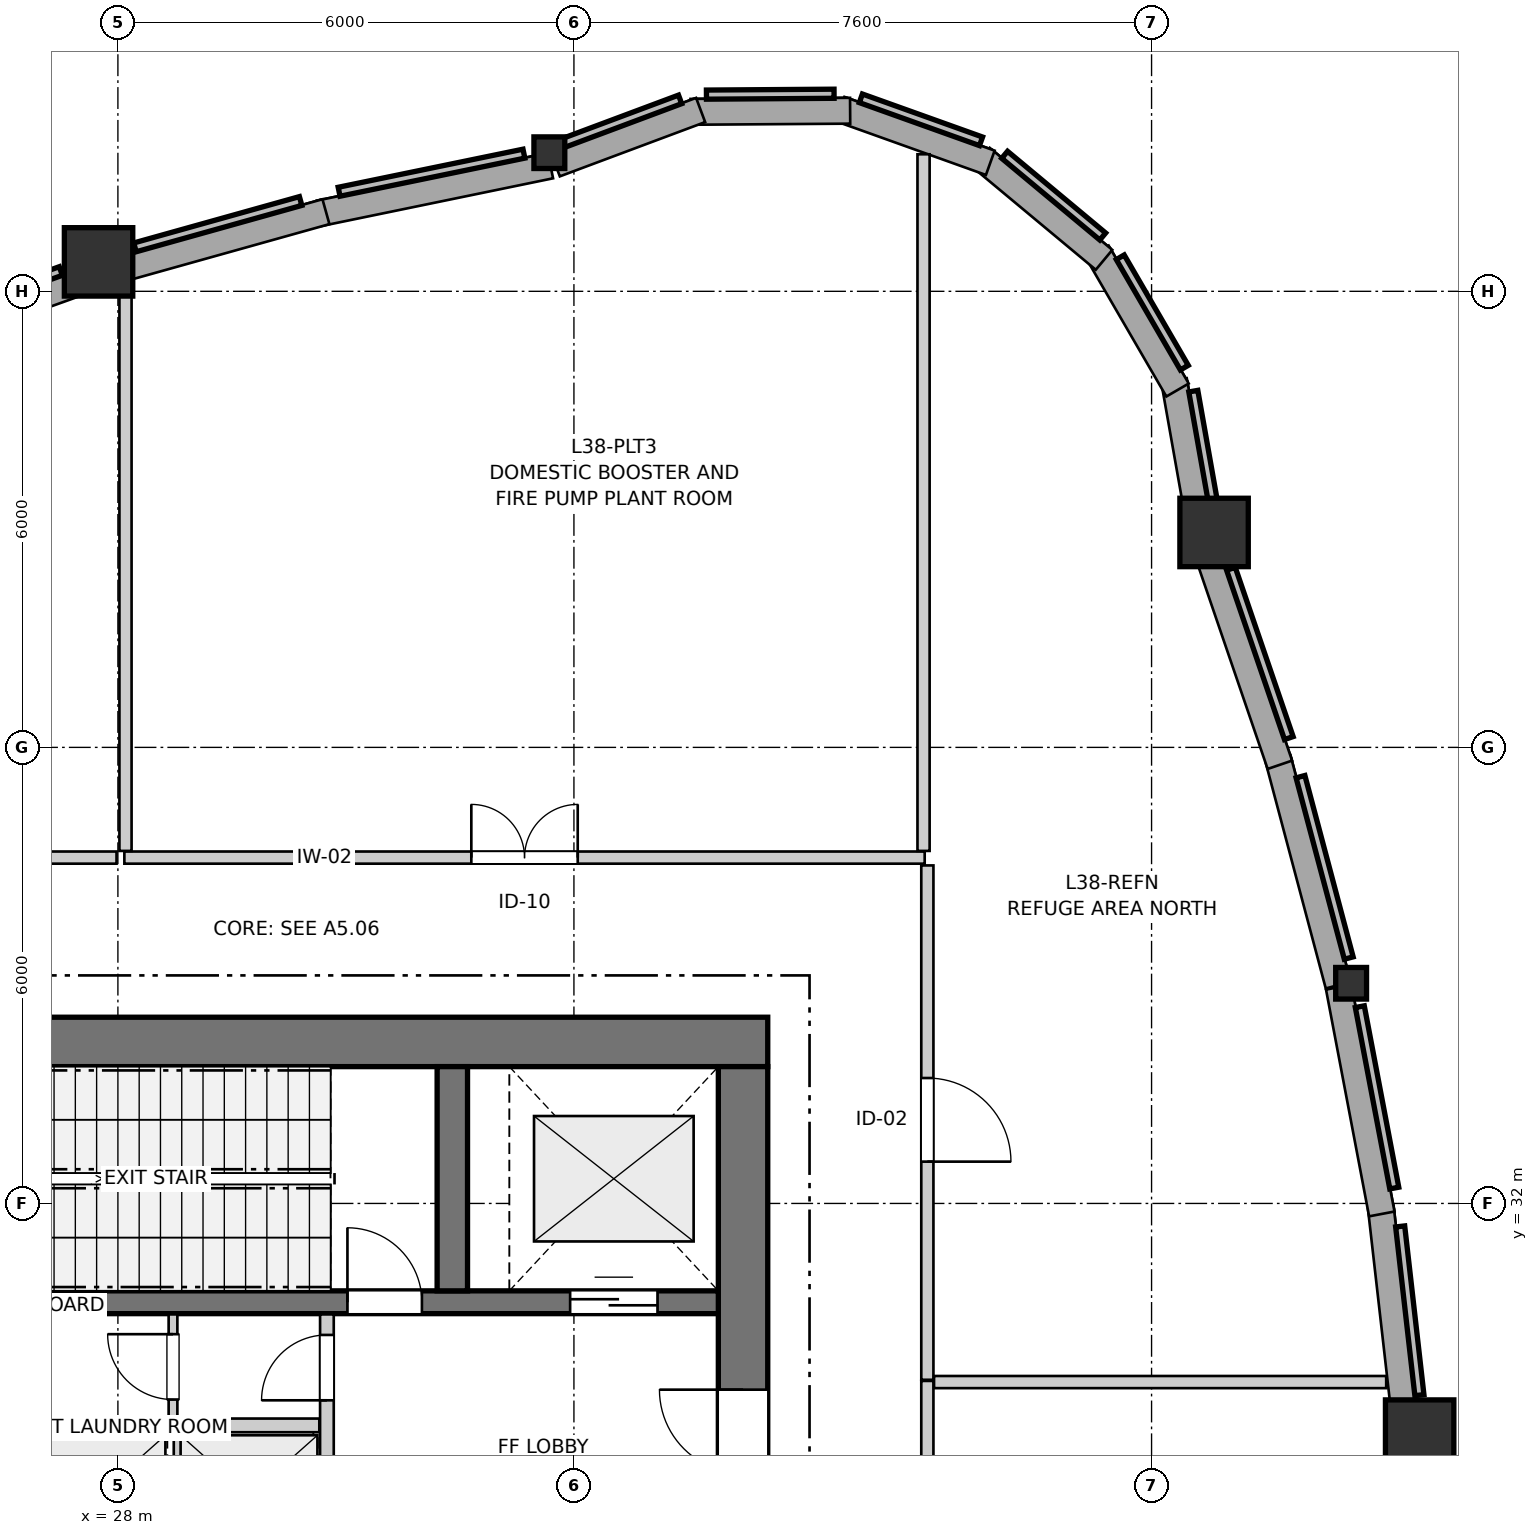
"""IFC4 building model, lengths in metres.
Left out: names, types, materials, properties, quantities, classifications, styles, units other than length and angle.
Written with IfcOpenShell. Run it as: python <this file> out.ifc"""

import sys

from ifc_helpers import new_model, si_unit, direction, frame, frame_2d, origin, origin_2d, place, context, subcontext, project, spatial, rectangle, i_section, extrude, source, transform, mapped, element, fill, save


model = new_model("IFC4")
c1 = context("Model", 3, precision=1e-05, world=origin(), true_north=direction((0.0, 1.0)))
c2 = subcontext(c1, "Body", "Model", "MODEL_VIEW")
j1 = project(units=[si_unit("LENGTHUNIT", "METRE"), si_unit("PLANEANGLEUNIT", "RADIAN")], contexts=[c1])
p1 = place(None, origin())
s1 = spatial("IfcSite", under=j1, at=p1, CompositionType="ELEMENT")
p2 = place(p1, origin())
s2 = spatial("IfcBuilding", under=s1, at=p2, CompositionType="ELEMENT")
p3 = place(p2, frame((0.0, 0.0, 128.0)))
s3 = spatial("IfcBuildingStorey", under=s2, at=p3, CompositionType="ELEMENT", Elevation=128.0)
p4 = place(p3, frame((36.55, 34.125, 0.0), z_axis=(0.0, 0.0, 1.0), x_axis=(-1.0, 0.0, 0.0)))
e1 = element("IfcWall", 1, at=p4, inside=s3, PredefinedType="SHEAR", context=c2, shape_type="SweptSolid", body=[
    extrude(rectangle(XDim=12.4, YDim=0.65, at=frame_2d((6.2, 0.0))), origin(), (0.0, 0.0, 1.0), 4.75),
])
p5 = place(p3, frame((36.225, 18.2, 0.0), z_axis=(0.0, 0.0, 1.0), x_axis=(0.0, 1.0, 0.0)))
e2 = element("IfcWall", 2, at=p5, inside=s3, PredefinedType="SHEAR", context=c2, shape_type="SweptSolid", body=[
    extrude(rectangle(XDim=15.6, YDim=0.65, at=frame_2d((7.8, 0.0))), origin(), (0.0, 0.0, 1.0), 4.75),
])
p6 = place(p5, frame((4.25, 0.0, 0.0)))
e3 = element("IfcOpeningElement", 3, at=p6, cuts=e2, PredefinedType="OPENING", context=c2, shape_type="SweptSolid", body=[
    extrude(rectangle(XDim=1.1, YDim=2.15, at=frame_2d((0.55, 1.075))), frame((0.0, 0.335, 0.0), z_axis=(0.0, -1.0, 0.0), x_axis=(1.0, 0.0, 0.0)), (0.0, 0.0, 1.0), 0.67),
])
p7 = place(p5, frame((10.25, 0.0, 0.0)))
e4 = element("IfcOpeningElement", 4, at=p7, cuts=e2, PredefinedType="OPENING", context=c2, shape_type="SweptSolid", body=[
    extrude(rectangle(XDim=1.1, YDim=2.15, at=frame_2d((0.55, 1.075))), frame((0.0, 0.335, 0.0), z_axis=(0.0, -1.0, 0.0), x_axis=(1.0, 0.0, 0.0)), (0.0, 0.0, 1.0), 0.67),
])
p8 = place(p3, frame((24.8, 30.7, 0.0), z_axis=(0.0, 0.0, 1.0), x_axis=(1.0, 0.0, 0.0)))
e5 = element("IfcWall", 5, at=p8, inside=s3, PredefinedType="SHEAR", context=c2, shape_type="SweptSolid", body=[
    extrude(rectangle(XDim=11.1, YDim=0.3, at=frame_2d((5.55, 0.0))), origin(), (0.0, 0.0, 1.0), 4.75),
])
p9 = place(p8, frame((6.22, 0.0, 0.0)))
e6 = element("IfcOpeningElement", 6, at=p9, cuts=e5, PredefinedType="OPENING", context=c2, shape_type="SweptSolid", body=[
    extrude(rectangle(XDim=0.98, YDim=2.15, at=frame_2d((0.49, 1.075))), frame((0.0, 0.16, 0.0), z_axis=(0.0, -1.0, 0.0), x_axis=(1.0, 0.0, 0.0)), (0.0, 0.0, 1.0), 0.32),
])
p10 = place(p8, frame((9.15, 0.0, 0.0)))
e7 = element("IfcOpeningElement", 7, at=p10, cuts=e5, PredefinedType="OPENING", context=c2, shape_type="SweptSolid", body=[
    extrude(rectangle(XDim=1.15, YDim=2.15, at=frame_2d((0.575, 1.075))), frame((0.0, 0.16, 0.0), z_axis=(0.0, -1.0, 0.0), x_axis=(1.0, 0.0, 0.0)), (0.0, 0.0, 1.0), 0.32),
])
p11 = place(p3, frame((32.4, 30.85, 0.0), z_axis=(0.0, 0.0, 1.0), x_axis=(0.0, 1.0, 0.0)))
e8 = element("IfcWall", 8, at=p11, inside=s3, PredefinedType="SHEAR", context=c2, shape_type="SweptSolid", body=[
    extrude(rectangle(XDim=2.95, YDim=0.4, at=frame_2d((1.475, 0.0))), origin(), (0.0, 0.0, 1.0), 4.75),
])
m1 = source(origin(), c2, "Body", "SweptSolid", [
    extrude(rectangle(XDim=0.9, YDim=0.9, at=origin_2d()), origin(), (0.0, 0.0, 1.0), 4.75),
])
p12 = place(p3, frame((45.127, 28.966, 0.0), z_axis=(0.0, 0.0, 1.0), x_axis=(1.0, 0.0, 0.0)))
e9 = element("IfcColumn", 9, at=p12, inside=s3, PredefinedType="COLUMN", context=c2, shape_type="MappedRepresentation", body=[
    mapped(m1, transform((0.0, 0.0, 0.0), x_axis=(1.0, 0.0, 0.0), y_axis=(0.0, 1.0, 0.0), z_axis=(0.0, 0.0, 1.0), scale=1.0)),
])
m2 = source(origin(), c2, "Body", "SweptSolid", [
    extrude(i_section(OverallWidth=0.406, OverallDepth=0.416, WebThickness=0.027, FlangeThickness=0.044, FilletRadius=0.015, at=origin_2d()), origin(), (0.0, 0.0, 1.0), 4.75),
])
p13 = place(p3, frame((44.226, 34.896, 0.0), z_axis=(0.0, 0.0, 1.0), x_axis=(1.0, 0.0, 0.0)))
e10 = element("IfcColumn", 10, at=p13, inside=s3, PredefinedType="PILASTER", context=c2, shape_type="MappedRepresentation", body=[
    mapped(m2, transform((0.0, 0.0, 0.0), x_axis=(1.0, 0.0, 0.0), y_axis=(0.0, 1.0, 0.0), z_axis=(0.0, 0.0, 1.0), scale=1.0)),
])
p14 = place(p3, frame((42.423, 40.828, 0.0), z_axis=(0.0, 0.0, 1.0), x_axis=(1.0, 0.0, 0.0)))
e11 = element("IfcColumn", 11, at=p14, inside=s3, PredefinedType="COLUMN", context=c2, shape_type="MappedRepresentation", body=[
    mapped(m1, transform((0.0, 0.0, 0.0), x_axis=(1.0, 0.0, 0.0), y_axis=(0.0, 1.0, 0.0), z_axis=(0.0, 0.0, 1.0), scale=1.0)),
])
p15 = place(p3, frame((33.677, 45.824, 0.0), z_axis=(0.0, 0.0, 1.0), x_axis=(1.0, 0.0, 0.0)))
e12 = element("IfcColumn", 12, at=p15, inside=s3, PredefinedType="PILASTER", context=c2, shape_type="MappedRepresentation", body=[
    mapped(m2, transform((0.0, 0.0, 0.0), x_axis=(1.0, 0.0, 0.0), y_axis=(0.0, 1.0, 0.0), z_axis=(0.0, 0.0, 1.0), scale=1.0)),
])
p16 = place(p3, frame((27.746, 44.387, 0.0), z_axis=(0.0, 0.0, 1.0), x_axis=(1.0, 0.0, 0.0)))
e13 = element("IfcColumn", 13, at=p16, inside=s3, PredefinedType="COLUMN", context=c2, shape_type="MappedRepresentation", body=[
    mapped(m1, transform((0.0, 0.0, 0.0), x_axis=(1.0, 0.0, 0.0), y_axis=(0.0, 1.0, 0.0), z_axis=(0.0, 0.0, 1.0), scale=1.0)),
])
p17 = place(p3, frame((45.071, 25.956, 0.0), z_axis=(0.0, 0.0, 1.0), x_axis=(-0.037997361734, 0.999277839493, 0.0)))
e14 = element("IfcWall", 14, at=p17, inside=s3, PredefinedType="SOLIDWALL", context=c2, shape_type="SweptSolid", body=[
    extrude(rectangle(XDim=2.776, YDim=0.34, at=frame_2d((1.388, 0.0))), origin(), (0.0, 0.0, 1.0), 4.28),
])
p18 = place(p3, frame((44.932, 29.175, 0.0), z_axis=(0.0, 0.0, 1.0), x_axis=(-0.113290188042, 0.993561942354, 0.0)))
e15 = element("IfcWall", 15, at=p18, inside=s3, PredefinedType="SOLIDWALL", context=c2, shape_type="SweptSolid", body=[
    extrude(rectangle(XDim=2.793, YDim=0.34, at=frame_2d((1.396, 0.0))), origin(), (0.0, 0.0, 1.0), 4.28),
])
p19 = place(p3, frame((44.629, 31.862, 0.0), z_axis=(0.0, 0.0, 1.0), x_axis=(-0.186690909565, 0.982418701108, 0.0)))
e16 = element("IfcWall", 16, at=p19, inside=s3, PredefinedType="SOLIDWALL", context=c2, shape_type="SweptSolid", body=[
    extrude(rectangle(XDim=3.037, YDim=0.34, at=frame_2d((1.518, 0.0))), origin(), (0.0, 0.0, 1.0), 4.28),
])
p20 = place(p3, frame((44.056, 34.872, 0.0), z_axis=(0.0, 0.0, 1.0), x_axis=(-0.257081647056, 0.966389686797, 0.0)))
e17 = element("IfcWall", 17, at=p20, inside=s3, PredefinedType="SOLIDWALL", context=c2, shape_type="SweptSolid", body=[
    extrude(rectangle(XDim=3.086, YDim=0.34, at=frame_2d((1.543, 0.0))), origin(), (0.0, 0.0, 1.0), 4.28),
])
p21 = place(p3, frame((43.288, 37.771, 0.0), z_axis=(0.0, 0.0, 1.0), x_axis=(-0.323537149191, 0.94621546864, 0.0)))
e18 = element("IfcWall", 18, at=p21, inside=s3, PredefinedType="SOLIDWALL", context=c2, shape_type="SweptSolid", body=[
    extrude(rectangle(XDim=2.942, YDim=0.34, at=frame_2d((1.471, 0.0))), origin(), (0.0, 0.0, 1.0), 4.28),
])
p22 = place(p3, frame((42.215, 41.024, 0.0), z_axis=(0.0, 0.0, 1.0), x_axis=(-0.17440141227, 0.984674640375, 0.0)))
e19 = element("IfcWall", 19, at=p22, inside=s3, PredefinedType="SOLIDWALL", context=c2, shape_type="SweptSolid", body=[
    extrude(rectangle(XDim=1.831, YDim=0.34, at=frame_2d((0.916, 0.0))), origin(), (0.0, 0.0, 1.0), 4.28),
])
p23 = place(p3, frame((41.942, 42.701, 0.0), z_axis=(0.0, 0.0, 1.0), x_axis=(-0.501902596059, 0.864924149315, 0.0)))
e20 = element("IfcWall", 20, at=p23, inside=s3, PredefinedType="SOLIDWALL", context=c2, shape_type="SweptSolid", body=[
    extrude(rectangle(XDim=2.099, YDim=0.34, at=frame_2d((1.049, 0.0))), origin(), (0.0, 0.0, 1.0), 4.28),
])
for number, where, z_axis, x_axis in (
    (21, (40.975, 44.414, 0.0), (0.0, 0.0, 1.0), (-0.768, 0.64, 0.0)),
    (22, (39.478, 45.691, 0.0), (0.0, 0.0, 1.0), (-0.942, 0.337, 0.0)),
    (23, (37.634, 46.376, 0.0), (0.0, 0.0, 1.0), (-1.0, -0.007, 0.0)),
):
    element("IfcWall", number, at=place(p3, frame(where, z_axis=z_axis, x_axis=x_axis)), inside=s3, PredefinedType="SOLIDWALL", context=c2, shape_type="SweptSolid", body=[
        extrude(rectangle(XDim=2.099, YDim=0.34, at=frame_2d((1.05, 0.0))), origin(), (0.0, 0.0, 1.0), 4.28),
    ])
p24 = place(p3, frame((35.667, 46.386, 0.0), z_axis=(0.0, 0.0, 1.0), x_axis=(-0.936761017964, -0.34996970615, 0.0)))
e24 = element("IfcWall", 24, at=p24, inside=s3, PredefinedType="SOLIDWALL", context=c2, shape_type="SweptSolid", body=[
    extrude(rectangle(XDim=2.041, YDim=0.34, at=frame_2d((1.021, 0.0))), origin(), (0.0, 0.0, 1.0), 4.28),
])
p25 = place(p3, frame((33.691, 45.653, 0.0), z_axis=(0.0, 0.0, 1.0), x_axis=(-0.979414063846, -0.201861565287, 0.0)))
e25 = element("IfcWall", 25, at=p25, inside=s3, PredefinedType="SOLIDWALL", context=c2, shape_type="SweptSolid", body=[
    extrude(rectangle(XDim=3.104, YDim=0.34, at=frame_2d((1.552, 0.0))), origin(), (0.0, 0.0, 1.0), 4.28),
])
p26 = place(p3, frame((30.737, 45.048, 0.0), z_axis=(0.0, 0.0, 1.0), x_axis=(-0.963026728711, -0.26940586443, 0.0)))
e26 = element("IfcWall", 26, at=p26, inside=s3, PredefinedType="SOLIDWALL", context=c2, shape_type="SweptSolid", body=[
    extrude(rectangle(XDim=2.829, YDim=0.34, at=frame_2d((1.415, 0.0))), origin(), (0.0, 0.0, 1.0), 4.28),
])
p27 = place(p3, frame((27.586, 44.149, 0.0), z_axis=(0.0, 0.0, 1.0), x_axis=(-0.941112277287, -0.338094190338, 0.0)))
e27 = element("IfcWall", 27, at=p27, inside=s3, PredefinedType="SOLIDWALL", context=c2, shape_type="SweptSolid", body=[
    extrude(rectangle(XDim=2.779, YDim=0.34, at=frame_2d((1.39, 0.0))), origin(), (0.0, 0.0, 1.0), 4.28),
])
p28 = place(p3, frame((30.75, 27.43, 0.0), z_axis=(0.0, 0.0, 1.0), x_axis=(0.0, 1.0, 0.0)))
e28 = element("IfcWall", 28, at=p28, inside=s3, PredefinedType="PARTITIONING", context=c2, shape_type="SweptSolid", body=[
    extrude(rectangle(XDim=3.11, YDim=0.18, at=frame_2d((1.555, 0.0))), origin(), (0.0, 0.0, 1.0), 4.75),
])
p29 = place(p28, frame((1.98, 0.0, 0.0)))
e29 = element("IfcOpeningElement", 29, at=p29, cuts=e28, PredefinedType="OPENING", context=c2, shape_type="SweptSolid", body=[
    extrude(rectangle(XDim=0.86, YDim=2.05, at=frame_2d((0.43, 1.025))), frame((0.0, 0.1, 0.0), z_axis=(0.0, -1.0, 0.0), x_axis=(1.0, 0.0, 0.0)), (0.0, 0.0, 1.0), 0.2),
])
p30 = place(p3, frame((24.81, 29.08, 0.0), z_axis=(0.0, 0.0, 1.0), x_axis=(1.0, 0.0, 0.0)))
e30 = element("IfcWall", 30, at=p30, inside=s3, PredefinedType="PARTITIONING", context=c2, shape_type="SweptSolid", body=[
    extrude(rectangle(XDim=5.84, YDim=0.18, at=frame_2d((2.92, 0.0))), origin(), (0.0, 0.0, 1.0), 4.75),
])
p31 = place(p3, frame((28.825, 27.2, 0.0), z_axis=(0.0, 0.0, 1.0), x_axis=(0.0, 1.0, 0.0)))
e31 = element("IfcWall", 31, at=p31, inside=s3, PredefinedType="PARTITIONING", context=c2, shape_type="SweptSolid", body=[
    extrude(rectangle(XDim=1.78, YDim=0.18, at=frame_2d((0.89, 0.0))), origin(), (0.0, 0.0, 1.0), 4.75),
])
p32 = place(p3, frame((28.725, 29.16, 0.0), z_axis=(0.0, 0.0, 1.0), x_axis=(0.0, 1.0, 0.0)))
e32 = element("IfcWall", 32, at=p32, inside=s3, PredefinedType="PARTITIONING", context=c2, shape_type="SweptSolid", body=[
    extrude(rectangle(XDim=1.38, YDim=0.115, at=frame_2d((0.69, 0.0))), origin(), (0.0, 0.0, 1.0), 4.75),
])
p33 = place(p32, frame((0.26, 0.0, 0.0)))
e33 = element("IfcOpeningElement", 33, at=p33, cuts=e32, PredefinedType="OPENING", context=c2, shape_type="SweptSolid", body=[
    extrude(rectangle(XDim=0.86, YDim=2.05, at=frame_2d((0.43, 1.025))), frame((0.0, 0.067, 0.0), z_axis=(0.0, -1.0, 0.0), x_axis=(1.0, 0.0, 0.0)), (0.0, 0.0, 1.0), 0.135),
])
p34 = place(p3, frame((28.085, 36.55, 0.0), z_axis=(0.0, 0.0, 1.0), x_axis=(1.0, 0.0, 0.0)))
e34 = element("IfcWall", 34, at=p34, inside=s3, PredefinedType="PARTITIONING", context=c2, shape_type="SweptSolid", body=[
    extrude(rectangle(XDim=10.53, YDim=0.16, at=frame_2d((5.265, 0.0))), origin(), (0.0, 0.0, 1.0), 4.218),
])
p35 = place(p34, frame((4.565, 0.0, 0.0)))
e35 = element("IfcOpeningElement", 35, at=p35, cuts=e34, PredefinedType="OPENING", context=c2, shape_type="SweptSolid", body=[
    extrude(rectangle(XDim=1.4, YDim=2.15, at=frame_2d((0.7, 1.075))), frame((0.0, 0.09, 0.0), z_axis=(0.0, -1.0, 0.0), x_axis=(1.0, 0.0, 0.0)), (0.0, 0.0, 1.0), 0.18),
])
p36 = place(p3, frame((38.65, 29.665, 0.0), z_axis=(0.0, 0.0, 1.0), x_axis=(0.0, -1.0, 0.0)))
e36 = element("IfcWall", 36, at=p36, inside=s3, PredefinedType="PARTITIONING", context=c2, shape_type="SweptSolid", body=[
    extrude(rectangle(XDim=7.33, YDim=0.16, at=frame_2d((3.665, 0.0))), origin(), (0.0, 0.0, 1.0), 4.75),
])
p37 = place(p36, frame((2.965, 0.0, 0.0)))
e37 = element("IfcOpeningElement", 37, at=p37, cuts=e36, PredefinedType="OPENING", context=c2, shape_type="SweptSolid", body=[
    extrude(rectangle(XDim=1.4, YDim=2.15, at=frame_2d((0.7, 1.075))), frame((0.0, 0.09, 0.0), z_axis=(0.0, -1.0, 0.0), x_axis=(1.0, 0.0, 0.0)), (0.0, 0.0, 1.0), 0.18),
])
p38 = place(p3, frame((38.65, 36.447, 0.0), z_axis=(0.0, 0.0, 1.0), x_axis=(0.0, -1.0, 0.0)))
e38 = element("IfcWall", 38, at=p38, inside=s3, PredefinedType="PARTITIONING", context=c2, shape_type="SweptSolid", body=[
    extrude(rectangle(XDim=6.767, YDim=0.16, at=frame_2d((3.384, 0.0))), origin(), (0.0, 0.0, 1.0), 4.218),
])
p39 = place(p38, frame((2.797, 0.0, 0.0)))
e39 = element("IfcOpeningElement", 39, at=p39, cuts=e38, PredefinedType="OPENING", context=c2, shape_type="SweptSolid", body=[
    extrude(rectangle(XDim=1.1, YDim=2.15, at=frame_2d((0.55, 1.075))), frame((0.0, 0.09, 0.0), z_axis=(0.0, -1.0, 0.0), x_axis=(1.0, 0.0, 0.0)), (0.0, 0.0, 1.0), 0.18),
])
p40 = place(p3, frame((38.6, 36.638, 0.0), z_axis=(0.0, 0.0, 1.0), x_axis=(0.0, 1.0, 0.0)))
e40 = element("IfcWall", 40, at=p40, inside=s3, PredefinedType="PARTITIONING", context=c2, shape_type="SweptSolid", body=[
    extrude(rectangle(XDim=9.165, YDim=0.16, at=frame_2d((4.583, 0.0))), origin(), (0.0, 0.0, 1.0), 4.75),
])
p41 = place(p3, frame((28.1, 36.638, 0.0), z_axis=(0.0, 0.0, 1.0), x_axis=(0.0, 1.0, 0.0)))
e41 = element("IfcWall", 41, at=p41, inside=s3, PredefinedType="PARTITIONING", context=c2, shape_type="SweptSolid", body=[
    extrude(rectangle(XDim=7.483, YDim=0.16, at=frame_2d((3.742, 0.0))), origin(), (0.0, 0.0, 1.0), 2.918),
])
p42 = place(p3, frame((38.738, 29.65, 0.0), z_axis=(0.0, 0.0, 1.0), x_axis=(1.0, 0.0, 0.0)))
e42 = element("IfcWall", 42, at=p42, inside=s3, PredefinedType="PARTITIONING", context=c2, shape_type="SweptSolid", body=[
    extrude(rectangle(XDim=5.949, YDim=0.16, at=frame_2d((2.975, 0.0))), origin(), (0.0, 0.0, 1.0), 4.75),
])
p43 = place(p3, frame((22.138, 36.55, 0.0), z_axis=(0.0, 0.0, 1.0), x_axis=(1.0, 0.0, 0.0)))
e43 = element("IfcWall", 43, at=p43, inside=s3, PredefinedType="PARTITIONING", context=c2, shape_type="SweptSolid", body=[
    extrude(rectangle(XDim=5.844, YDim=0.16, at=frame_2d((2.922, 0.0))), origin(), (0.0, 0.0, 1.0), 4.75),
])
m3 = source(origin(), c2, "Body", "SweptSolid", [
    extrude(rectangle(XDim=0.98, YDim=2.15, at=frame_2d((0.49, 1.075))), frame((0.0, 0.025, 0.0), z_axis=(0.0, -1.0, 0.0), x_axis=(1.0, 0.0, 0.0)), (0.0, 0.0, 1.0), 0.05),
])
p44 = place(p9, origin())
e44 = element("IfcDoor", 44, at=p44, inside=s3, OperationType="SINGLE_SWING_LEFT", PredefinedType="DOOR", context=c2, shape_type="MappedRepresentation", body=[
    mapped(m3, transform((0.0, 0.0, 0.0), x_axis=(1.0, 0.0, 0.0), y_axis=(0.0, 1.0, 0.0), z_axis=(0.0, 0.0, 1.0), scale=1.0)),
])
fill(e6, e44)
m4 = source(origin(), c2, "Body", "SweptSolid", [
    extrude(rectangle(XDim=1.15, YDim=2.15, at=frame_2d((0.575, 1.075))), frame((0.0, 0.025, 0.0), z_axis=(0.0, -1.0, 0.0), x_axis=(1.0, 0.0, 0.0)), (0.0, 0.0, 1.0), 0.05),
])
p45 = place(p10, origin())
e45 = element("IfcDoor", 45, at=p45, inside=s3, OperationType="DOUBLE_DOOR_SLIDING", PredefinedType="DOOR", context=c2, shape_type="MappedRepresentation", body=[
    mapped(m4, transform((0.0, 0.0, 0.0), x_axis=(1.0, 0.0, 0.0), y_axis=(0.0, 1.0, 0.0), z_axis=(0.0, 0.0, 1.0), scale=1.0)),
])
fill(e7, e45)
m5 = source(origin(), c2, "Body", "SweptSolid", [
    extrude(rectangle(XDim=1.1, YDim=2.15, at=frame_2d((0.55, 1.075))), frame((0.0, 0.025, 0.0), z_axis=(0.0, -1.0, 0.0), x_axis=(1.0, 0.0, 0.0)), (0.0, 0.0, 1.0), 0.05),
])
p46 = place(p7, origin())
e46 = element("IfcDoor", 46, at=p46, inside=s3, OperationType="SINGLE_SWING_RIGHT", PredefinedType="DOOR", context=c2, shape_type="MappedRepresentation", body=[
    mapped(m5, transform((0.0, 0.0, 0.0), x_axis=(1.0, 0.0, 0.0), y_axis=(0.0, 1.0, 0.0), z_axis=(0.0, 0.0, 1.0), scale=1.0)),
])
fill(e4, e46)
m6 = source(origin(), c2, "Body", "SweptSolid", [
    extrude(rectangle(XDim=0.86, YDim=2.05, at=frame_2d((0.43, 1.025))), frame((0.0, 0.025, 0.0), z_axis=(0.0, -1.0, 0.0), x_axis=(1.0, 0.0, 0.0)), (0.0, 0.0, 1.0), 0.05),
])
p47 = place(p29, origin())
e47 = element("IfcDoor", 47, at=p47, inside=s3, OperationType="SINGLE_SWING_LEFT", PredefinedType="DOOR", context=c2, shape_type="MappedRepresentation", body=[
    mapped(m6, transform((0.0, 0.0, 0.0), x_axis=(1.0, 0.0, 0.0), y_axis=(0.0, 1.0, 0.0), z_axis=(0.0, 0.0, 1.0), scale=1.0)),
])
fill(e29, e47)
p48 = place(p33, origin())
e48 = element("IfcDoor", 48, at=p48, inside=s3, OperationType="SINGLE_SWING_RIGHT", PredefinedType="DOOR", context=c2, shape_type="MappedRepresentation", body=[
    mapped(m6, transform((0.0, 0.0, 0.0), x_axis=(1.0, 0.0, 0.0), y_axis=(0.0, 1.0, 0.0), z_axis=(0.0, 0.0, 1.0), scale=1.0)),
])
fill(e33, e48)
m7 = source(origin(), c2, "Body", "SweptSolid", [
    extrude(rectangle(XDim=1.4, YDim=2.15, at=frame_2d((0.7, 1.075))), frame((0.0, 0.025, 0.0), z_axis=(0.0, -1.0, 0.0), x_axis=(1.0, 0.0, 0.0)), (0.0, 0.0, 1.0), 0.05),
])
p49 = place(p35, origin())
e49 = element("IfcDoor", 49, at=p49, inside=s3, OperationType="DOUBLE_DOOR_SINGLE_SWING", PredefinedType="DOOR", context=c2, shape_type="MappedRepresentation", body=[
    mapped(m7, transform((0.0, 0.0, 0.0), x_axis=(1.0, 0.0, 0.0), y_axis=(0.0, 1.0, 0.0), z_axis=(0.0, 0.0, 1.0), scale=1.0)),
])
fill(e35, e49)
p50 = place(p39, origin())
e50 = element("IfcDoor", 50, at=p50, inside=s3, OperationType="SINGLE_SWING_RIGHT", PredefinedType="DOOR", context=c2, shape_type="MappedRepresentation", body=[
    mapped(m5, transform((0.0, 0.0, 0.0), x_axis=(1.0, 0.0, 0.0), y_axis=(0.0, 1.0, 0.0), z_axis=(0.0, 0.0, 1.0), scale=1.0)),
])
fill(e39, e50)
save(model, sys.argv[1])
